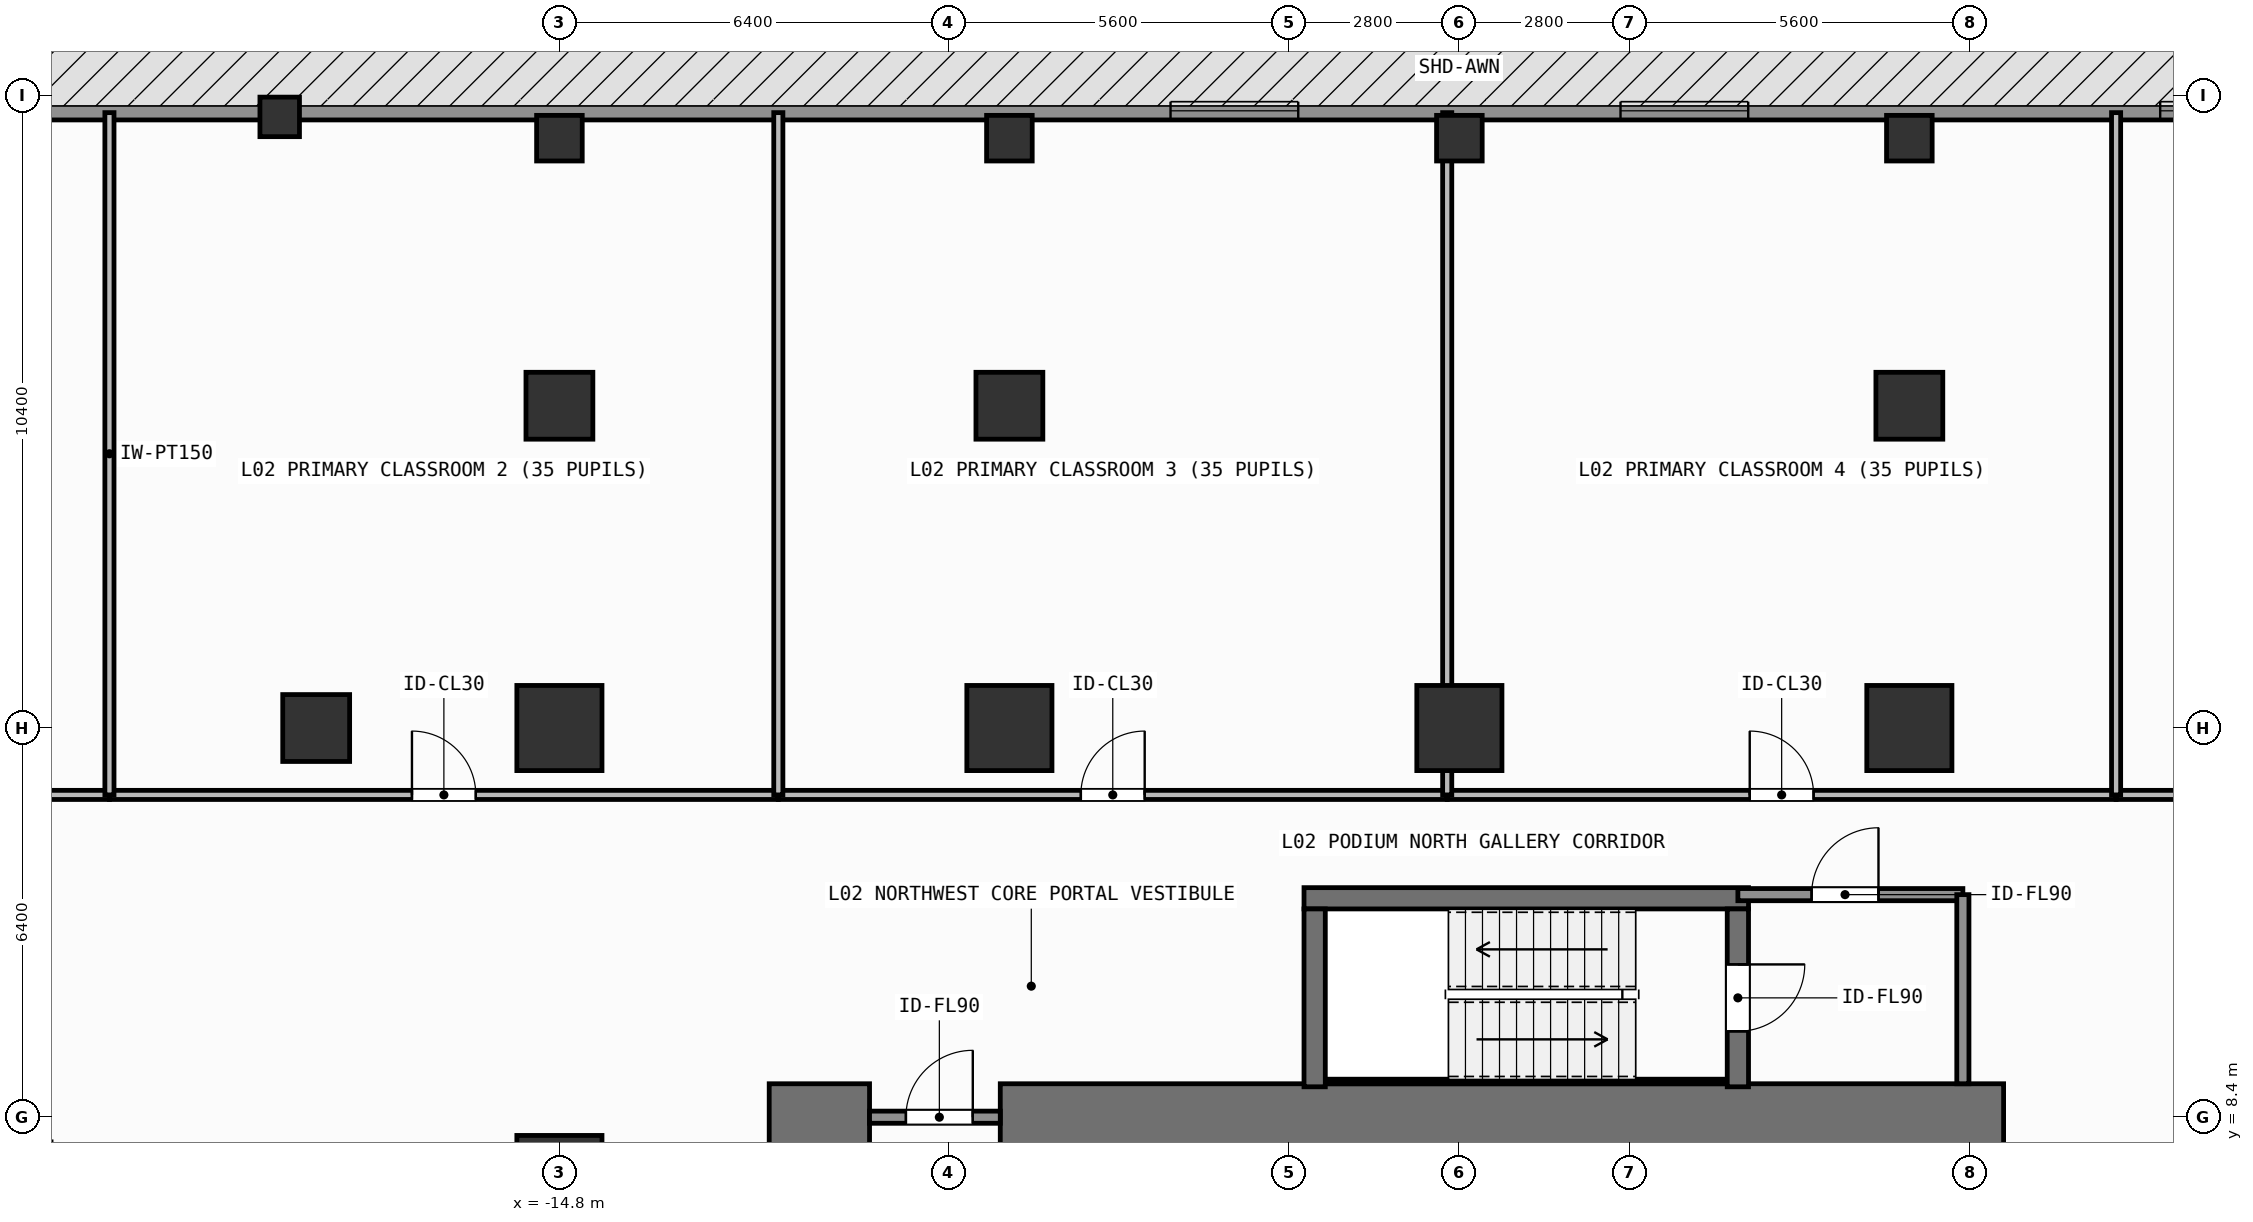
"""IFC4 building model, lengths in metres.
Left out: names, types, materials, properties, quantities, classifications, styles, units other than length and angle.
Written with IfcOpenShell. Run it as: python <this file> out.ifc"""

import sys

from ifc_helpers import new_model, si_unit, direction, frame, frame_2d, origin, origin_2d, place, context, subcontext, project, spatial, rectangle, extrude, element, fill, save


model = new_model("IFC4")
c1 = context("Model", 3, precision=1e-05, world=origin(), true_north=direction((0.0, 1.0)))
c2 = subcontext(c1, "Body", "Model", "MODEL_VIEW")
j1 = project(units=[si_unit("LENGTHUNIT", "METRE"), si_unit("PLANEANGLEUNIT", "RADIAN")], contexts=[c1])
p1 = place(None, origin())
s1 = spatial("IfcSite", under=j1, at=p1, CompositionType="ELEMENT")
p2 = place(p1, origin())
s2 = spatial("IfcBuilding", under=s1, at=p2, CompositionType="ELEMENT")
p3 = place(p2, frame((0.0, 0.0, 4.8)))
s3 = spatial("IfcBuildingStorey", under=s2, at=p3, CompositionType="ELEMENT", Elevation=4.8)
p4 = place(p3, frame((-11.35, 8.4, 0.0), z_axis=(0.0, 0.0, 1.0), x_axis=(1.0, 0.0, 0.0)))
e1 = element("IfcWall", 1, at=p4, inside=s3, PredefinedType="SHEAR", context=c2, shape_type="SweptSolid", body=[
    extrude(rectangle(XDim=1.65, YDim=1.1, at=frame_2d((0.825, 0.0))), origin(), (0.0, 0.0, 1.0), 4.2),
])
p5 = place(p3, frame((-7.55, 8.4, 0.0), z_axis=(0.0, 0.0, 1.0), x_axis=(1.0, 0.0, 0.0)))
e2 = element("IfcWall", 2, at=p5, inside=s3, PredefinedType="SHEAR", context=c2, shape_type="SweptSolid", body=[
    extrude(rectangle(XDim=16.5, YDim=1.1, at=frame_2d((8.25, 0.0))), origin(), (0.0, 0.0, 1.0), 4.2),
])
p6 = place(p3, frame((-2.555, 12.0, 0.0), z_axis=(0.0, 0.0, 1.0), x_axis=(1.0, 0.0, 0.0)))
e3 = element("IfcWall", 3, at=p6, inside=s3, PredefinedType="SHEAR", context=c2, shape_type="SweptSolid", body=[
    extrude(rectangle(XDim=7.31, YDim=0.35, at=frame_2d((3.655, 0.0))), origin(), (0.0, 0.0, 1.0), 4.2),
])
p7 = place(p3, frame((-2.2, 8.988, 0.0), z_axis=(0.0, 0.0, 1.0), x_axis=(1.0, 0.0, 0.0)))
e4 = element("IfcWall", 4, at=p7, inside=s3, PredefinedType="SHEAR", context=c2, shape_type="SweptSolid", body=[
    extrude(rectangle(XDim=6.6, YDim=0.075, at=frame_2d((3.3, 0.0))), origin(), (0.0, 0.0, 1.0), 4.2),
])
p8 = place(p3, frame((-2.38, 8.9, 0.0), z_axis=(0.0, 0.0, 1.0), x_axis=(0.0, 1.0, 0.0)))
e5 = element("IfcWall", 5, at=p8, inside=s3, PredefinedType="SHEAR", context=c2, shape_type="SweptSolid", body=[
    extrude(rectangle(XDim=2.925, YDim=0.35, at=frame_2d((1.462, 0.0))), origin(), (0.0, 0.0, 1.0), 4.2),
])
p9 = place(p3, frame((4.58, 11.825, 0.0), z_axis=(0.0, 0.0, 1.0), x_axis=(0.0, -1.0, 0.0)))
e6 = element("IfcWall", 6, at=p9, inside=s3, PredefinedType="SHEAR", context=c2, shape_type="SweptSolid", body=[
    extrude(rectangle(XDim=2.925, YDim=0.35, at=frame_2d((1.462, 0.0))), origin(), (0.0, 0.0, 1.0), 4.2),
])
p10 = place(p9, frame((0.913, 0.0, 0.0)))
e7 = element("IfcOpeningElement", 7, at=p10, cuts=e6, PredefinedType="OPENING", context=c2, shape_type="SweptSolid", body=[
    extrude(rectangle(XDim=1.1, YDim=2.15, at=frame_2d((0.55, 1.075))), frame((0.0, 0.185, 0.0), z_axis=(0.0, -1.0, 0.0), x_axis=(1.0, 0.0, 0.0)), (0.0, 0.0, 1.0), 0.37),
])
for number, where, z_axis, x_axis in (
    (8, (-14.8, 14.8, 0.0), (0.0, 0.0, 1.0), (1.0, 0.0, 0.0)),
    (9, (-7.4, 14.8, 0.0), (0.0, 0.0, 1.0), (1.0, 0.0, 0.0)),
    (10, (0.0, 14.8, 0.0), (0.0, 0.0, 1.0), (1.0, 0.0, 0.0)),
    (11, (7.4, 14.8, 0.0), (0.0, 0.0, 1.0), (1.0, 0.0, 0.0)),
    (12, (-14.8, 7.4, 0.0), (0.0, 0.0, 1.0), (1.0, 0.0, 0.0)),
):
    element("IfcColumn", number, at=place(p3, frame(where, z_axis=z_axis, x_axis=x_axis)), inside=s3, PredefinedType="COLUMN", context=c2, shape_type="SweptSolid", body=[
        extrude(rectangle(XDim=1.4, YDim=1.4, at=origin_2d()), origin(), (0.0, 0.0, 1.0), 4.2),
    ])
for number, where, z_axis, x_axis in (
    (13, (-18.8, 14.8, 0.0), (0.0, 0.0, 1.0), (1.0, 0.0, 0.0)),
    (14, (-14.8, 20.1, 0.0), (0.0, 0.0, 1.0), (1.0, 0.0, 0.0)),
    (15, (-7.4, 20.1, 0.0), (0.0, 0.0, 1.0), (1.0, 0.0, 0.0)),
    (16, (7.4, 20.1, 0.0), (0.0, 0.0, 1.0), (1.0, 0.0, 0.0)),
):
    element("IfcColumn", number, at=place(p3, frame(where, z_axis=z_axis, x_axis=x_axis)), inside=s3, PredefinedType="COLUMN", context=c2, shape_type="SweptSolid", body=[
        extrude(rectangle(XDim=1.1, YDim=1.1, at=origin_2d()), origin(), (0.0, 0.0, 1.0), 4.2),
    ])
for number, where, z_axis, x_axis in (
    (17, (-14.8, 24.5, 0.0), (0.0, 0.0, 1.0), (1.0, 0.0, 0.0)),
    (18, (-7.4, 24.5, 0.0), (0.0, 0.0, 1.0), (1.0, 0.0, 0.0)),
    (19, (0.0, 24.5, 0.0), (0.0, 0.0, 1.0), (1.0, 0.0, 0.0)),
    (20, (7.4, 24.5, 0.0), (0.0, 0.0, 1.0), (1.0, 0.0, 0.0)),
):
    element("IfcColumn", number, at=place(p3, frame(where, z_axis=z_axis, x_axis=x_axis)), inside=s3, PredefinedType="COLUMN", context=c2, shape_type="SweptSolid", body=[
        extrude(rectangle(XDim=0.75, YDim=0.75, at=origin_2d()), origin(), (0.0, 0.0, 1.0), 4.2),
    ])
p11 = place(p3, frame((-19.4, 24.85, 0.0), z_axis=(0.0, 0.0, 1.0), x_axis=(1.0, 0.0, 0.0)))
e21 = element("IfcColumn", 21, at=p11, inside=s3, PredefinedType="PILASTER", context=c2, shape_type="SweptSolid", body=[
    extrude(rectangle(XDim=0.65, YDim=0.65, at=origin_2d()), origin(), (0.0, 0.0, 1.0), 4.2),
])
p12 = place(p3, frame((-29.1, 24.95, 0.0), z_axis=(0.0, 0.0, 1.0), x_axis=(1.0, 0.0, 0.0)))
e22 = element("IfcWall", 22, at=p12, inside=s3, PredefinedType="SOLIDWALL", context=c2, shape_type="SweptSolid", body=[
    extrude(rectangle(XDim=58.2, YDim=0.3, at=frame_2d((29.1, 0.0))), origin(), (0.0, 0.0, 1.0), 3.96),
])
p13 = place(p12, frame((24.35, 0.0, 0.85)))
e23 = element("IfcOpeningElement", 23, at=p13, cuts=e22, PredefinedType="OPENING", context=c2, shape_type="SweptSolid", body=[
    extrude(rectangle(XDim=2.1, YDim=2.2, at=frame_2d((1.05, 1.1))), frame((0.0, 0.16, 0.0), z_axis=(0.0, -1.0, 0.0), x_axis=(1.0, 0.0, 0.0)), (0.0, 0.0, 1.0), 0.32),
])
p14 = place(p12, frame((31.75, 0.0, 0.85)))
e24 = element("IfcOpeningElement", 24, at=p14, cuts=e22, PredefinedType="OPENING", context=c2, shape_type="SweptSolid", body=[
    extrude(rectangle(XDim=2.1, YDim=2.2, at=frame_2d((1.05, 1.1))), frame((0.0, 0.16, 0.0), z_axis=(0.0, -1.0, 0.0), x_axis=(1.0, 0.0, 0.0)), (0.0, 0.0, 1.0), 0.32),
])
p15 = place(p12, frame((40.625, 0.0, 0.85)))
e25 = element("IfcOpeningElement", 25, at=p15, cuts=e22, PredefinedType="OPENING", context=c2, shape_type="SweptSolid", body=[
    extrude(rectangle(XDim=2.1, YDim=2.2, at=frame_2d((1.05, 1.1))), frame((0.0, 0.16, 0.0), z_axis=(0.0, -1.0, 0.0), x_axis=(1.0, 0.0, 0.0)), (0.0, 0.0, 1.0), 0.32),
])
p16 = place(p12, frame((45.175, 0.0, 0.85)))
e26 = element("IfcOpeningElement", 26, at=p16, cuts=e22, PredefinedType="OPENING", context=c2, shape_type="SweptSolid", body=[
    extrude(rectangle(XDim=2.1, YDim=2.2, at=frame_2d((1.05, 1.1))), frame((0.0, 0.16, 0.0), z_axis=(0.0, -1.0, 0.0), x_axis=(1.0, 0.0, 0.0)), (0.0, 0.0, 1.0), 0.32),
])
p17 = place(p3, frame((4.58, 12.06, 0.0), z_axis=(0.0, 0.0, 1.0), x_axis=(1.0, 0.0, 0.0)))
e27 = element("IfcWall", 27, at=p17, inside=s3, PredefinedType="SOLIDWALL", context=c2, shape_type="SweptSolid", body=[
    extrude(rectangle(XDim=3.7, YDim=0.2, at=frame_2d((1.85, 0.0))), origin(), (0.0, 0.0, 1.0), 3.96),
])
p18 = place(p17, frame((1.212, 0.0, 0.0)))
e28 = element("IfcOpeningElement", 28, at=p18, cuts=e27, PredefinedType="OPENING", context=c2, shape_type="SweptSolid", body=[
    extrude(rectangle(XDim=1.1, YDim=2.15, at=frame_2d((0.55, 1.075))), frame((0.0, 0.11, 0.0), z_axis=(0.0, -1.0, 0.0), x_axis=(1.0, 0.0, 0.0)), (0.0, 0.0, 1.0), 0.22),
])
p19 = place(p3, frame((-9.7, 8.4, 0.0), z_axis=(0.0, 0.0, 1.0), x_axis=(1.0, 0.0, 0.0)))
e29 = element("IfcWall", 29, at=p19, inside=s3, PredefinedType="SOLIDWALL", context=c2, shape_type="SweptSolid", body=[
    extrude(rectangle(XDim=2.15, YDim=0.2, at=frame_2d((1.075, 0.0))), origin(), (0.0, 0.0, 1.0), 3.0),
])
p20 = place(p19, frame((0.598, 0.0, 0.0)))
e30 = element("IfcOpeningElement", 30, at=p20, cuts=e29, PredefinedType="OPENING", context=c2, shape_type="SweptSolid", body=[
    extrude(rectangle(XDim=1.1, YDim=2.15, at=frame_2d((0.55, 1.075))), frame((0.0, 0.11, 0.0), z_axis=(0.0, -1.0, 0.0), x_axis=(1.0, 0.0, 0.0)), (0.0, 0.0, 1.0), 0.22),
])
p21 = place(p3, frame((-33.42, 13.7, 0.0), z_axis=(0.0, 0.0, 1.0), x_axis=(1.0, 0.0, 0.0)))
e31 = element("IfcWall", 31, at=p21, inside=s3, PredefinedType="PARTITIONING", context=c2, shape_type="SweptSolid", body=[
    extrude(rectangle(XDim=11.22, YDim=0.15, at=frame_2d((5.61, 0.0))), origin(), (0.0, 0.0, 1.0), 3.96),
])
p22 = place(p21, frame((5.175, 0.0, 0.0)))
e32 = element("IfcOpeningElement", 32, at=p22, cuts=e31, PredefinedType="OPENING", context=c2, shape_type="SweptSolid", body=[
    extrude(rectangle(XDim=1.05, YDim=2.2, at=frame_2d((0.525, 1.1))), frame((0.0, 0.085, 0.0), z_axis=(0.0, -1.0, 0.0), x_axis=(1.0, 0.0, 0.0)), (0.0, 0.0, 1.0), 0.17),
])
p23 = place(p3, frame((-22.2, 13.7, 0.0), z_axis=(0.0, 0.0, 1.0), x_axis=(1.0, 0.0, 0.0)))
e33 = element("IfcWall", 33, at=p23, inside=s3, PredefinedType="PARTITIONING", context=c2, shape_type="SweptSolid", body=[
    extrude(rectangle(XDim=11.0, YDim=0.15, at=frame_2d((5.5, 0.0))), origin(), (0.0, 0.0, 1.0), 3.96),
])
p24 = place(p23, frame((4.975, 0.0, 0.0)))
e34 = element("IfcOpeningElement", 34, at=p24, cuts=e33, PredefinedType="OPENING", context=c2, shape_type="SweptSolid", body=[
    extrude(rectangle(XDim=1.05, YDim=2.2, at=frame_2d((0.525, 1.1))), frame((0.0, 0.085, 0.0), z_axis=(0.0, -1.0, 0.0), x_axis=(1.0, 0.0, 0.0)), (0.0, 0.0, 1.0), 0.17),
])
p25 = place(p3, frame((-11.2, 13.7, 0.0), z_axis=(0.0, 0.0, 1.0), x_axis=(1.0, 0.0, 0.0)))
e35 = element("IfcWall", 35, at=p25, inside=s3, PredefinedType="PARTITIONING", context=c2, shape_type="SweptSolid", body=[
    extrude(rectangle(XDim=11.0, YDim=0.15, at=frame_2d((5.5, 0.0))), origin(), (0.0, 0.0, 1.0), 3.96),
])
p26 = place(p25, frame((4.975, 0.0, 0.0)))
e36 = element("IfcOpeningElement", 36, at=p26, cuts=e35, PredefinedType="OPENING", context=c2, shape_type="SweptSolid", body=[
    extrude(rectangle(XDim=1.05, YDim=2.2, at=frame_2d((0.525, 1.1))), frame((0.0, 0.085, 0.0), z_axis=(0.0, -1.0, 0.0), x_axis=(1.0, 0.0, 0.0)), (0.0, 0.0, 1.0), 0.17),
])
p27 = place(p3, frame((-0.2, 13.7, 0.0), z_axis=(0.0, 0.0, 1.0), x_axis=(1.0, 0.0, 0.0)))
e37 = element("IfcWall", 37, at=p27, inside=s3, PredefinedType="PARTITIONING", context=c2, shape_type="SweptSolid", body=[
    extrude(rectangle(XDim=11.0, YDim=0.15, at=frame_2d((5.5, 0.0))), origin(), (0.0, 0.0, 1.0), 3.96),
])
p28 = place(p27, frame((4.975, 0.0, 0.0)))
e38 = element("IfcOpeningElement", 38, at=p28, cuts=e37, PredefinedType="OPENING", context=c2, shape_type="SweptSolid", body=[
    extrude(rectangle(XDim=1.05, YDim=2.2, at=frame_2d((0.525, 1.1))), frame((0.0, 0.085, 0.0), z_axis=(0.0, -1.0, 0.0), x_axis=(1.0, 0.0, 0.0)), (0.0, 0.0, 1.0), 0.17),
])
p29 = place(p3, frame((10.8, 13.7, 0.0), z_axis=(0.0, 0.0, 1.0), x_axis=(1.0, 0.0, 0.0)))
e39 = element("IfcWall", 39, at=p29, inside=s3, PredefinedType="PARTITIONING", context=c2, shape_type="SweptSolid", body=[
    extrude(rectangle(XDim=11.2, YDim=0.15, at=frame_2d((5.6, 0.0))), origin(), (0.0, 0.0, 1.0), 3.96),
])
p30 = place(p29, frame((4.986, 0.0, 0.0)))
e40 = element("IfcOpeningElement", 40, at=p30, cuts=e39, PredefinedType="OPENING", context=c2, shape_type="SweptSolid", body=[
    extrude(rectangle(XDim=1.05, YDim=2.2, at=frame_2d((0.525, 1.1))), frame((0.0, 0.085, 0.0), z_axis=(0.0, -1.0, 0.0), x_axis=(1.0, 0.0, 0.0)), (0.0, 0.0, 1.0), 0.17),
])
p31 = place(p3, frame((8.28, 8.95, 0.0), z_axis=(0.0, 0.0, 1.0), x_axis=(0.0, 1.0, 0.0)))
e41 = element("IfcWall", 41, at=p31, inside=s3, PredefinedType="SOLIDWALL", context=c2, shape_type="SweptSolid", body=[
    extrude(rectangle(XDim=3.11, YDim=0.2, at=frame_2d((1.555, 0.0))), origin(), (0.0, 0.0, 1.0), 3.96),
])
for number, where, z_axis, x_axis in (
    (42, (-22.2, 13.7, 0.0), (0.0, 0.0, 1.0), (0.0, 1.0, 0.0)),
    (43, (-11.2, 13.7, 0.0), (0.0, 0.0, 1.0), (0.0, 1.0, 0.0)),
):
    element("IfcWall", number, at=place(p3, frame(where, z_axis=z_axis, x_axis=x_axis)), inside=s3, PredefinedType="PARTITIONING", context=c2, shape_type="SweptSolid", body=[
        extrude(rectangle(XDim=11.22, YDim=0.15, at=frame_2d((5.61, 0.0))), origin(), (0.0, 0.0, 1.0), 3.96),
    ])
p32 = place(p3, frame((-0.2, 13.7, 0.0), z_axis=(0.0, 0.0, 1.0), x_axis=(0.0, 1.0, 0.0)))
e44 = element("IfcWall", 44, at=p32, inside=s3, PredefinedType="PARTITIONING", context=c2, shape_type="SweptSolid", body=[
    extrude(rectangle(XDim=11.22, YDim=0.15, at=frame_2d((5.61, 0.0))), origin(), (0.0, 0.0, 1.0), 3.25),
])
p33 = place(p3, frame((10.8, 13.7, 0.0), z_axis=(0.0, 0.0, 1.0), x_axis=(0.0, 1.0, 0.0)))
e45 = element("IfcWall", 45, at=p33, inside=s3, PredefinedType="PARTITIONING", context=c2, shape_type="SweptSolid", body=[
    extrude(rectangle(XDim=11.22, YDim=0.15, at=frame_2d((5.61, 0.0))), origin(), (0.0, 0.0, 1.0), 3.96),
])
p34 = place(p13, origin())
e46 = element("IfcWindow", 46, at=p34, inside=s3, PartitioningType="SINGLE_PANEL", PredefinedType="WINDOW", context=c2, shape_type="SweptSolid", body=[
    extrude(rectangle(XDim=2.1, YDim=2.2, at=frame_2d((1.05, 1.1))), frame((0.0, 0.03, 0.0), z_axis=(0.0, -1.0, 0.0), x_axis=(1.0, 0.0, 0.0)), (0.0, 0.0, 1.0), 0.06),
])
fill(e23, e46)
p35 = place(p14, origin())
e47 = element("IfcWindow", 47, at=p35, inside=s3, PartitioningType="SINGLE_PANEL", PredefinedType="WINDOW", context=c2, shape_type="SweptSolid", body=[
    extrude(rectangle(XDim=2.1, YDim=2.2, at=frame_2d((1.05, 1.1))), frame((0.0, 0.03, 0.0), z_axis=(0.0, -1.0, 0.0), x_axis=(1.0, 0.0, 0.0)), (0.0, 0.0, 1.0), 0.06),
])
fill(e24, e47)
p36 = place(p15, origin())
e48 = element("IfcWindow", 48, at=p36, inside=s3, PartitioningType="SINGLE_PANEL", PredefinedType="WINDOW", context=c2, shape_type="SweptSolid", body=[
    extrude(rectangle(XDim=2.1, YDim=2.2, at=frame_2d((1.05, 1.1))), frame((0.0, 0.03, 0.0), z_axis=(0.0, -1.0, 0.0), x_axis=(1.0, 0.0, 0.0)), (0.0, 0.0, 1.0), 0.06),
])
fill(e25, e48)
p37 = place(p10, origin())
e49 = element("IfcDoor", 49, at=p37, inside=s3, OperationType="SINGLE_SWING_LEFT", PredefinedType="DOOR", context=c2, shape_type="SweptSolid", body=[
    extrude(rectangle(XDim=1.1, YDim=2.15, at=frame_2d((0.55, 1.075))), frame((0.0, 0.025, 0.0), z_axis=(0.0, -1.0, 0.0), x_axis=(1.0, 0.0, 0.0)), (0.0, 0.0, 1.0), 0.05),
])
fill(e7, e49)
p38 = place(p18, origin())
e50 = element("IfcDoor", 50, at=p38, inside=s3, OperationType="SINGLE_SWING_RIGHT", PredefinedType="DOOR", context=c2, shape_type="SweptSolid", body=[
    extrude(rectangle(XDim=1.1, YDim=2.15, at=frame_2d((0.55, 1.075))), frame((0.0, 0.025, 0.0), z_axis=(0.0, -1.0, 0.0), x_axis=(1.0, 0.0, 0.0)), (0.0, 0.0, 1.0), 0.05),
])
fill(e28, e50)
p39 = place(p20, origin())
e51 = element("IfcDoor", 51, at=p39, inside=s3, OperationType="SINGLE_SWING_RIGHT", PredefinedType="DOOR", context=c2, shape_type="SweptSolid", body=[
    extrude(rectangle(XDim=1.1, YDim=2.15, at=frame_2d((0.55, 1.075))), frame((0.0, 0.025, 0.0), z_axis=(0.0, -1.0, 0.0), x_axis=(1.0, 0.0, 0.0)), (0.0, 0.0, 1.0), 0.05),
])
fill(e30, e51)
p40 = place(p24, origin())
e52 = element("IfcDoor", 52, at=p40, inside=s3, OperationType="SINGLE_SWING_LEFT", PredefinedType="DOOR", context=c2, shape_type="SweptSolid", body=[
    extrude(rectangle(XDim=1.05, YDim=2.2, at=frame_2d((0.525, 1.1))), frame((0.0, 0.025, 0.0), z_axis=(0.0, -1.0, 0.0), x_axis=(1.0, 0.0, 0.0)), (0.0, 0.0, 1.0), 0.05),
])
fill(e34, e52)
p41 = place(p26, origin())
e53 = element("IfcDoor", 53, at=p41, inside=s3, OperationType="SINGLE_SWING_RIGHT", PredefinedType="DOOR", context=c2, shape_type="SweptSolid", body=[
    extrude(rectangle(XDim=1.05, YDim=2.2, at=frame_2d((0.525, 1.1))), frame((0.0, 0.025, 0.0), z_axis=(0.0, -1.0, 0.0), x_axis=(1.0, 0.0, 0.0)), (0.0, 0.0, 1.0), 0.05),
])
fill(e36, e53)
p42 = place(p28, origin())
e54 = element("IfcDoor", 54, at=p42, inside=s3, OperationType="SINGLE_SWING_LEFT", PredefinedType="DOOR", context=c2, shape_type="SweptSolid", body=[
    extrude(rectangle(XDim=1.05, YDim=2.2, at=frame_2d((0.525, 1.1))), frame((0.0, 0.025, 0.0), z_axis=(0.0, -1.0, 0.0), x_axis=(1.0, 0.0, 0.0)), (0.0, 0.0, 1.0), 0.05),
])
fill(e38, e54)
save(model, sys.argv[1])
